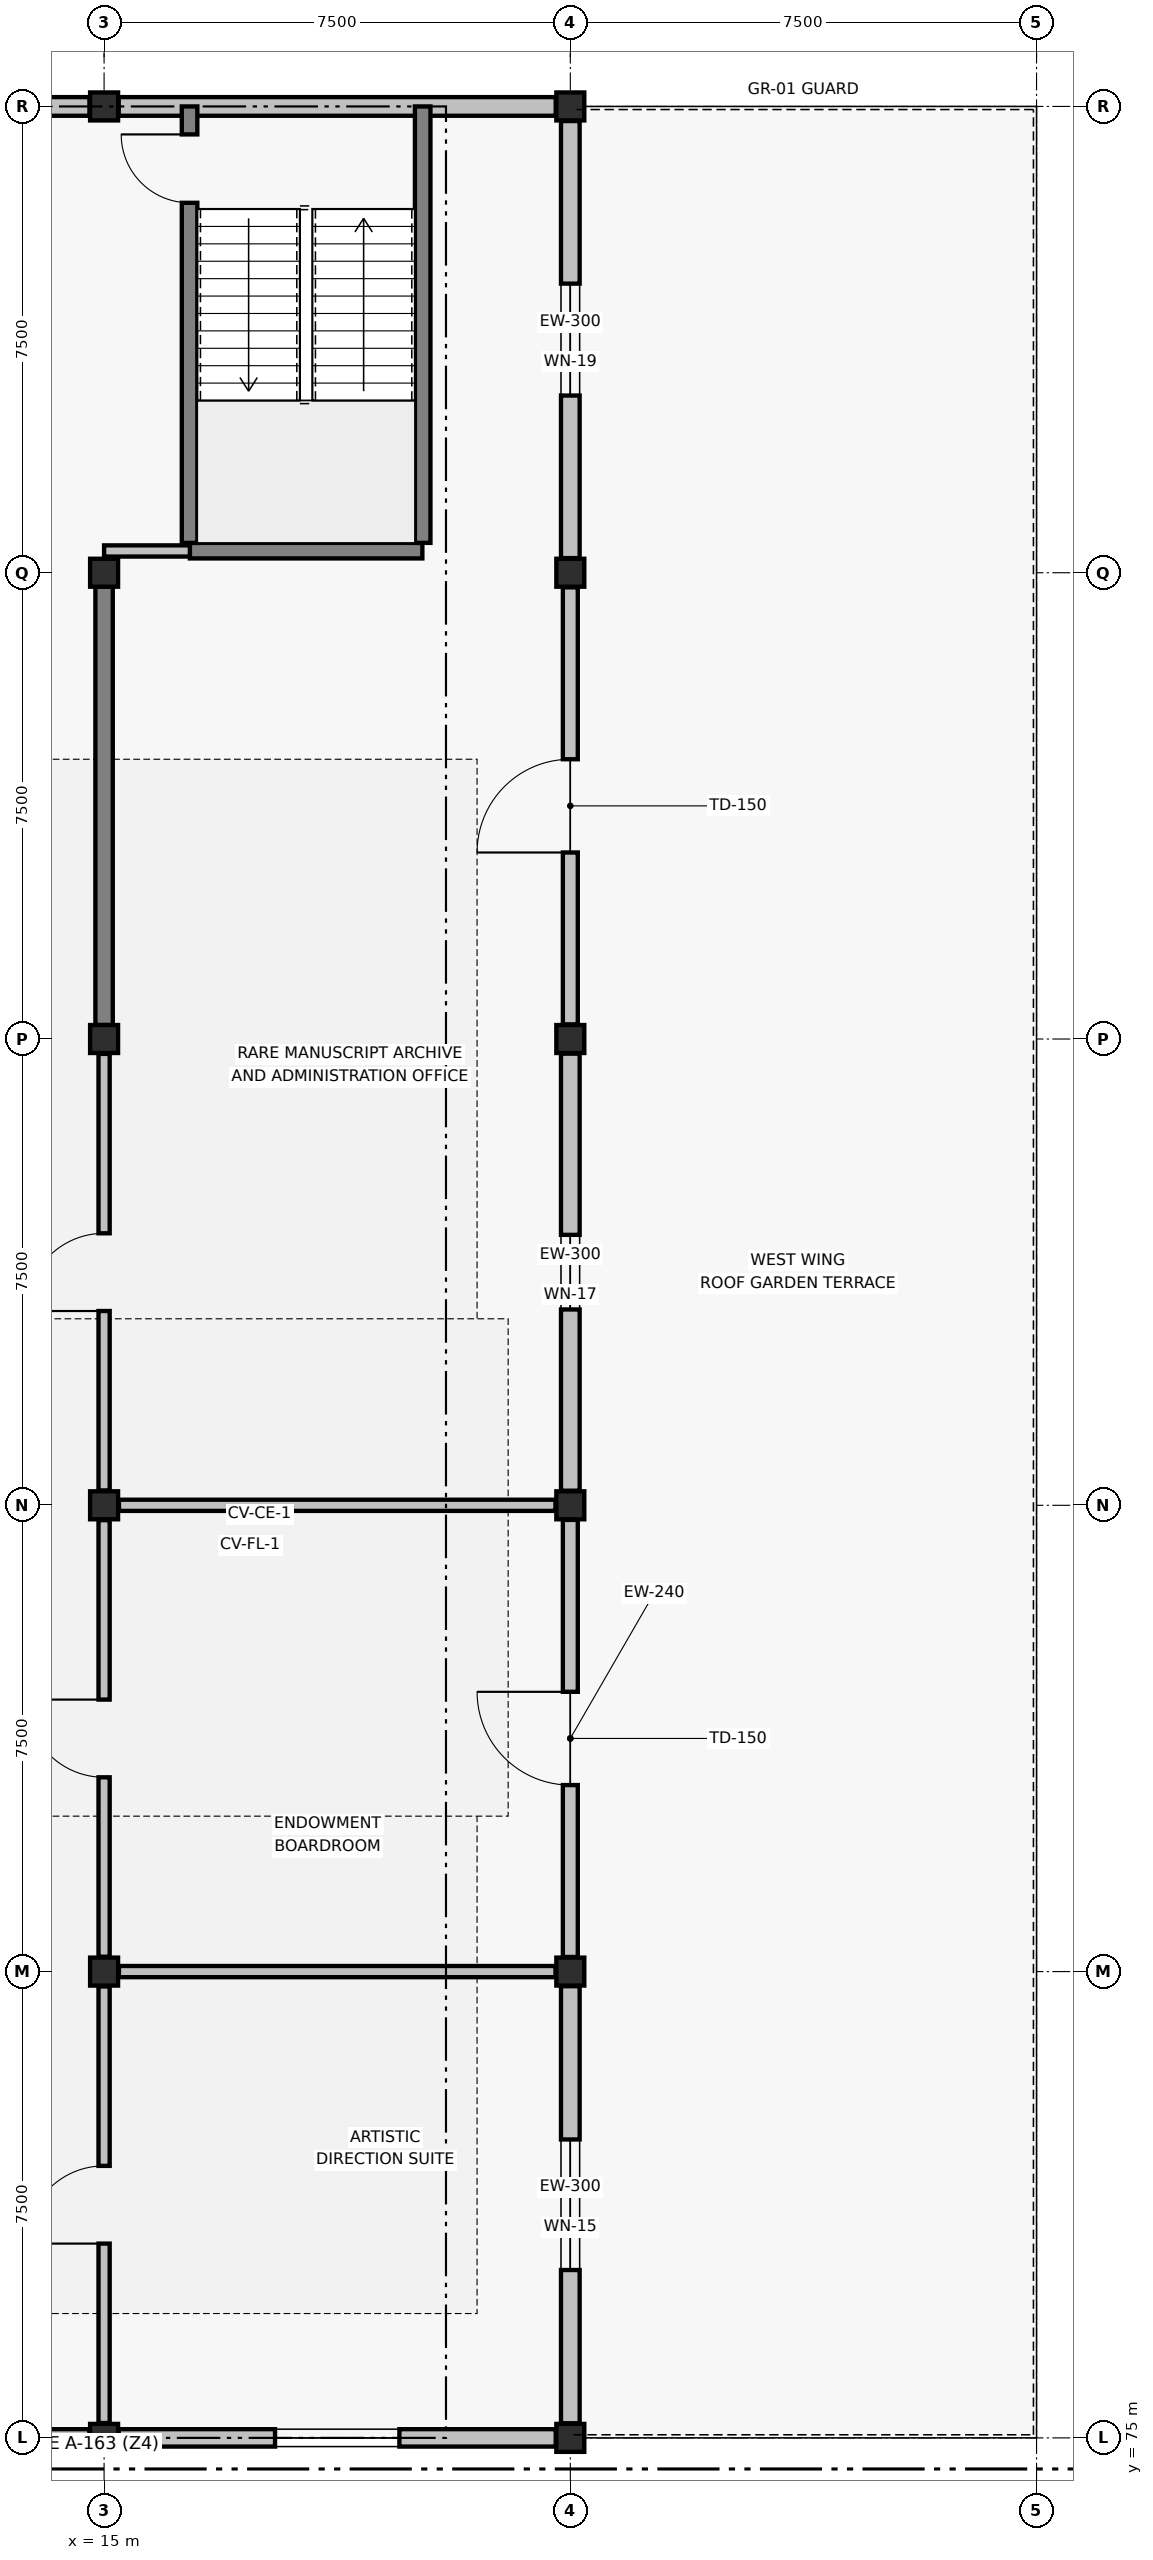
"""IFC4 building model, lengths in metres.
Left out: names, types, materials, properties, quantities, classifications, styles, units other than length and angle.
Written with IfcOpenShell. Run it as: python <this file> out.ifc"""

import sys

from ifc_helpers import new_model, si_unit, direction, frame, frame_2d, origin, origin_2d, place, context, subcontext, project, spatial, rectangle, extrude, element, fill, save


model = new_model("IFC4")
c1 = context("Model", 3, precision=1e-05, world=origin(), true_north=direction((0.0, 1.0)))
c2 = subcontext(c1, "Body", "Model", "MODEL_VIEW")
j1 = project(units=[si_unit("LENGTHUNIT", "METRE"), si_unit("PLANEANGLEUNIT", "RADIAN")], contexts=[c1])
p1 = place(None, origin())
s1 = spatial("IfcSite", under=j1, at=p1, CompositionType="ELEMENT")
p2 = place(p1, origin())
s2 = spatial("IfcBuilding", under=s1, at=p2, CompositionType="ELEMENT")
p3 = place(p2, frame((0.0, 0.0, 21.0)))
s3 = spatial("IfcBuildingStorey", under=s2, at=p3, CompositionType="ELEMENT", Elevation=21.0)
for number, where, z_axis, x_axis in (
    (1, (15.0, 75.0, 0.0), (0.0, 0.0, 1.0), (1.0, 0.0, 0.0)),
    (2, (15.0, 82.5, 0.0), (0.0, 0.0, 1.0), (1.0, 0.0, 0.0)),
    (3, (15.0, 90.0, 0.0), (0.0, 0.0, 1.0), (1.0, 0.0, 0.0)),
    (4, (15.0, 97.5, 0.0), (0.0, 0.0, 1.0), (1.0, 0.0, 0.0)),
    (5, (15.0, 105.0, 0.0), (0.0, 0.0, 1.0), (1.0, 0.0, 0.0)),
    (6, (15.0, 112.5, 0.0), (0.0, 0.0, 1.0), (1.0, 0.0, 0.0)),
    (7, (22.5, 75.0, 0.0), (0.0, 0.0, 1.0), (1.0, 0.0, 0.0)),
    (8, (22.5, 82.5, 0.0), (0.0, 0.0, 1.0), (1.0, 0.0, 0.0)),
    (9, (22.5, 90.0, 0.0), (0.0, 0.0, 1.0), (1.0, 0.0, 0.0)),
    (10, (22.5, 97.5, 0.0), (0.0, 0.0, 1.0), (1.0, 0.0, 0.0)),
    (11, (22.5, 105.0, 0.0), (0.0, 0.0, 1.0), (1.0, 0.0, 0.0)),
    (12, (22.5, 112.5, 0.0), (0.0, 0.0, 1.0), (1.0, 0.0, 0.0)),
):
    element("IfcColumn", number, at=place(p3, frame(where, z_axis=z_axis, x_axis=x_axis)), inside=s3, PredefinedType="COLUMN", context=c2, shape_type="SweptSolid", body=[
        extrude(rectangle(XDim=0.45, YDim=0.45, at=origin_2d()), origin(), (0.0, 0.0, 1.0), 4.2),
    ])
p4 = place(p3, frame((15.0, 97.725, 0.0), z_axis=(0.0, 0.0, 1.0), x_axis=(0.0, 1.0, 0.0)))
e13 = element("IfcWall", 13, at=p4, inside=s3, PredefinedType="SHEAR", context=c2, shape_type="SweptSolid", body=[
    extrude(rectangle(XDim=7.05, YDim=0.28, at=frame_2d((3.525, 0.0))), origin(), (0.0, 0.0, 1.0), 3.9),
])
p5 = place(p3, frame((8.12, 112.5, 0.0), z_axis=(0.0, 0.0, 1.0), x_axis=(1.0, 0.0, 0.0)))
e14 = element("IfcWall", 14, at=p5, inside=s3, PredefinedType="SOLIDWALL", context=c2, shape_type="SweptSolid", body=[
    extrude(rectangle(XDim=6.645, YDim=0.3, at=frame_2d((3.322, 0.0))), origin(), (0.0, 0.0, 1.0), 2.89),
])
p6 = place(p5, frame((2.33, 0.0, 0.6)))
e15 = element("IfcOpeningElement", 15, at=p6, cuts=e14, PredefinedType="OPENING", context=c2, shape_type="SweptSolid", body=[
    extrude(rectangle(XDim=1.6, YDim=1.3, at=frame_2d((0.8, 0.65))), frame((0.0, 0.16, 0.0), z_axis=(0.0, -1.0, 0.0), x_axis=(1.0, 0.0, 0.0)), (0.0, 0.0, 1.0), 0.32),
])
p7 = place(p3, frame((8.12, 75.0, 0.0), z_axis=(0.0, 0.0, 1.0), x_axis=(1.0, 0.0, 0.0)))
e16 = element("IfcWall", 16, at=p7, inside=s3, PredefinedType="SOLIDWALL", context=c2, shape_type="SweptSolid", body=[
    extrude(rectangle(XDim=6.645, YDim=0.28, at=frame_2d((3.322, 0.0))), origin(), (0.0, 0.0, 1.0), 2.89),
])
p8 = place(p7, frame((2.205, 0.0, 0.6)))
e17 = element("IfcOpeningElement", 17, at=p8, cuts=e16, PredefinedType="OPENING", context=c2, shape_type="SweptSolid", body=[
    extrude(rectangle(XDim=1.85, YDim=1.8, at=frame_2d((0.925, 0.9))), frame((0.0, 0.15, 0.0), z_axis=(0.0, -1.0, 0.0), x_axis=(1.0, 0.0, 0.0)), (0.0, 0.0, 1.0), 0.3),
])
p9 = place(p3, frame((15.235, 112.5, 0.0), z_axis=(0.0, 0.0, 1.0), x_axis=(1.0, 0.0, 0.0)))
e18 = element("IfcWall", 18, at=p9, inside=s3, PredefinedType="SOLIDWALL", context=c2, shape_type="SweptSolid", body=[
    extrude(rectangle(XDim=7.03, YDim=0.3, at=frame_2d((3.515, 0.0))), origin(), (0.0, 0.0, 1.0), 2.89),
])
p10 = place(p3, frame((15.235, 75.0, 0.0), z_axis=(0.0, 0.0, 1.0), x_axis=(1.0, 0.0, 0.0)))
e19 = element("IfcWall", 19, at=p10, inside=s3, PredefinedType="SOLIDWALL", context=c2, shape_type="SweptSolid", body=[
    extrude(rectangle(XDim=7.03, YDim=0.28, at=frame_2d((3.515, 0.0))), origin(), (0.0, 0.0, 1.0), 2.89),
])
p11 = place(p10, frame((2.515, 0.0, 0.6)))
e20 = element("IfcOpeningElement", 20, at=p11, cuts=e19, PredefinedType="OPENING", context=c2, shape_type="SweptSolid", body=[
    extrude(rectangle(XDim=2.0, YDim=1.45, at=frame_2d((1.0, 0.725))), frame((0.0, 0.15, 0.0), z_axis=(0.0, -1.0, 0.0), x_axis=(1.0, 0.0, 0.0)), (0.0, 0.0, 1.0), 0.3),
])
p12 = place(p3, frame((22.5, 75.235, 0.0), z_axis=(0.0, 0.0, 1.0), x_axis=(0.0, 1.0, 0.0)))
e21 = element("IfcWall", 21, at=p12, inside=s3, PredefinedType="SOLIDWALL", context=c2, shape_type="SweptSolid", body=[
    extrude(rectangle(XDim=7.03, YDim=0.3, at=frame_2d((3.515, 0.0))), origin(), (0.0, 0.0, 1.0), 3.09),
])
p13 = place(p12, frame((2.465, 0.0, 0.6)))
e22 = element("IfcOpeningElement", 22, at=p13, cuts=e21, PredefinedType="OPENING", context=c2, shape_type="SweptSolid", body=[
    extrude(rectangle(XDim=2.1, YDim=1.3, at=frame_2d((1.05, 0.65))), frame((0.0, 0.16, 0.0), z_axis=(0.0, -1.0, 0.0), x_axis=(1.0, 0.0, 0.0)), (0.0, 0.0, 1.0), 0.32),
])
p14 = place(p3, frame((22.5, 82.735, 0.0), z_axis=(0.0, 0.0, 1.0), x_axis=(0.0, 1.0, 0.0)))
e23 = element("IfcWall", 23, at=p14, inside=s3, PredefinedType="SOLIDWALL", context=c2, shape_type="SweptSolid", body=[
    extrude(rectangle(XDim=7.03, YDim=0.24, at=frame_2d((3.515, 0.0))), origin(), (0.0, 0.0, 1.0), 2.94),
])
p15 = place(p14, frame((2.765, 0.0, 0.0)))
e24 = element("IfcOpeningElement", 24, at=p15, cuts=e23, PredefinedType="OPENING", context=c2, shape_type="SweptSolid", body=[
    extrude(rectangle(XDim=1.5, YDim=2.15, at=frame_2d((0.75, 1.075))), frame((0.0, 0.13, 0.0), z_axis=(0.0, -1.0, 0.0), x_axis=(1.0, 0.0, 0.0)), (0.0, 0.0, 1.0), 0.26),
])
p16 = place(p3, frame((22.5, 90.235, 0.0), z_axis=(0.0, 0.0, 1.0), x_axis=(0.0, 1.0, 0.0)))
e25 = element("IfcWall", 25, at=p16, inside=s3, PredefinedType="SOLIDWALL", context=c2, shape_type="SweptSolid", body=[
    extrude(rectangle(XDim=7.03, YDim=0.3, at=frame_2d((3.515, 0.0))), origin(), (0.0, 0.0, 1.0), 2.94),
])
p17 = place(p16, frame((2.915, 0.0, 0.6)))
e26 = element("IfcOpeningElement", 26, at=p17, cuts=e25, PredefinedType="OPENING", context=c2, shape_type="SweptSolid", body=[
    extrude(rectangle(XDim=1.2, YDim=1.2, at=frame_2d((0.6, 0.6))), frame((0.0, 0.16, 0.0), z_axis=(0.0, -1.0, 0.0), x_axis=(1.0, 0.0, 0.0)), (0.0, 0.0, 1.0), 0.32),
])
p18 = place(p3, frame((22.5, 97.735, 0.0), z_axis=(0.0, 0.0, 1.0), x_axis=(0.0, 1.0, 0.0)))
e27 = element("IfcWall", 27, at=p18, inside=s3, PredefinedType="SOLIDWALL", context=c2, shape_type="SweptSolid", body=[
    extrude(rectangle(XDim=7.03, YDim=0.24, at=frame_2d((3.515, 0.0))), origin(), (0.0, 0.0, 1.0), 2.99),
])
p19 = place(p18, frame((2.765, 0.0, 0.0)))
e28 = element("IfcOpeningElement", 28, at=p19, cuts=e27, PredefinedType="OPENING", context=c2, shape_type="SweptSolid", body=[
    extrude(rectangle(XDim=1.5, YDim=2.15, at=frame_2d((0.75, 1.075))), frame((0.0, 0.13, 0.0), z_axis=(0.0, -1.0, 0.0), x_axis=(1.0, 0.0, 0.0)), (0.0, 0.0, 1.0), 0.26),
])
p20 = place(p3, frame((22.5, 105.235, 0.0), z_axis=(0.0, 0.0, 1.0), x_axis=(0.0, 1.0, 0.0)))
e29 = element("IfcWall", 29, at=p20, inside=s3, PredefinedType="SOLIDWALL", context=c2, shape_type="SweptSolid", body=[
    extrude(rectangle(XDim=7.03, YDim=0.3, at=frame_2d((3.515, 0.0))), origin(), (0.0, 0.0, 1.0), 3.04),
])
p21 = place(p20, frame((2.615, 0.0, 0.6)))
e30 = element("IfcOpeningElement", 30, at=p21, cuts=e29, PredefinedType="OPENING", context=c2, shape_type="SweptSolid", body=[
    extrude(rectangle(XDim=1.8, YDim=1.2, at=frame_2d((0.9, 0.6))), frame((0.0, 0.16, 0.0), z_axis=(0.0, -1.0, 0.0), x_axis=(1.0, 0.0, 0.0)), (0.0, 0.0, 1.0), 0.32),
])
p22 = place(p3, frame((16.38, 105.355, 0.0), z_axis=(0.0, 0.0, 1.0), x_axis=(1.0, 0.0, 0.0)))
e31 = element("IfcWall", 31, at=p22, inside=s3, PredefinedType="SOLIDWALL", context=c2, shape_type="SweptSolid", body=[
    extrude(rectangle(XDim=3.74, YDim=0.25, at=frame_2d((1.87, 0.0))), origin(), (0.0, 0.0, 1.0), 3.92),
])
p23 = place(p3, frame((16.375, 105.48, 0.0), z_axis=(0.0, 0.0, 1.0), x_axis=(0.0, 1.0, 0.0)))
e32 = element("IfcWall", 32, at=p23, inside=s3, PredefinedType="SOLIDWALL", context=c2, shape_type="SweptSolid", body=[
    extrude(rectangle(XDim=7.02, YDim=0.25, at=frame_2d((3.51, 0.0))), origin(), (0.0, 0.0, 1.0), 3.92),
])
p24 = place(p23, frame((5.47, 0.0, 0.0)))
e33 = element("IfcOpeningElement", 33, at=p24, cuts=e32, PredefinedType="OPENING", context=c2, shape_type="SweptSolid", body=[
    extrude(rectangle(XDim=1.1, YDim=2.15, at=frame_2d((0.55, 1.075))), frame((0.0, 0.135, 0.0), z_axis=(0.0, -1.0, 0.0), x_axis=(1.0, 0.0, 0.0)), (0.0, 0.0, 1.0), 0.27),
])
p25 = place(p3, frame((20.125, 105.48, 0.0), z_axis=(0.0, 0.0, 1.0), x_axis=(0.0, 1.0, 0.0)))
e34 = element("IfcWall", 34, at=p25, inside=s3, PredefinedType="SOLIDWALL", context=c2, shape_type="SweptSolid", body=[
    extrude(rectangle(XDim=7.02, YDim=0.25, at=frame_2d((3.51, 0.0))), origin(), (0.0, 0.0, 1.0), 3.92),
])
p26 = place(p3, frame((15.0, 105.35, 0.0), z_axis=(0.0, 0.0, 1.0), x_axis=(1.0, 0.0, 0.0)))
e35 = element("IfcWall", 35, at=p26, inside=s3, PredefinedType="PARTITIONING", context=c2, shape_type="SweptSolid", body=[
    extrude(rectangle(XDim=1.38, YDim=0.18, at=frame_2d((0.69, 0.0))), origin(), (0.0, 0.0, 1.0), 2.89),
])
for number, where, z_axis, x_axis in (
    (36, (15.239, 82.5, 0.0), (0.0, 0.0, 1.0), (1.0, 0.0, 0.0)),
    (37, (15.239, 90.0, 0.0), (0.0, 0.0, 1.0), (1.0, 0.0, 0.0)),
):
    element("IfcWall", number, at=place(p3, frame(where, z_axis=z_axis, x_axis=x_axis)), inside=s3, PredefinedType="PARTITIONING", context=c2, shape_type="SweptSolid", body=[
        extrude(rectangle(XDim=7.022, YDim=0.18, at=frame_2d((3.511, 0.0))), origin(), (0.0, 0.0, 1.0), 2.89),
    ])
p27 = place(p3, frame((15.0, 75.239, 0.0), z_axis=(0.0, 0.0, 1.0), x_axis=(0.0, 1.0, 0.0)))
e38 = element("IfcWall", 38, at=p27, inside=s3, PredefinedType="PARTITIONING", context=c2, shape_type="SweptSolid", body=[
    extrude(rectangle(XDim=7.022, YDim=0.18, at=frame_2d((3.511, 0.0))), origin(), (0.0, 0.0, 1.0), 2.89),
])
p28 = place(p27, frame((2.886, 0.0, 0.0)))
e39 = element("IfcOpeningElement", 39, at=p28, cuts=e38, PredefinedType="OPENING", context=c2, shape_type="SweptSolid", body=[
    extrude(rectangle(XDim=1.25, YDim=2.14, at=frame_2d((0.625, 1.07))), frame((0.0, 0.1, 0.0), z_axis=(0.0, -1.0, 0.0), x_axis=(1.0, 0.0, 0.0)), (0.0, 0.0, 1.0), 0.2),
])
p29 = place(p3, frame((15.0, 82.739, 0.0), z_axis=(0.0, 0.0, 1.0), x_axis=(0.0, 1.0, 0.0)))
e40 = element("IfcWall", 40, at=p29, inside=s3, PredefinedType="PARTITIONING", context=c2, shape_type="SweptSolid", body=[
    extrude(rectangle(XDim=7.022, YDim=0.18, at=frame_2d((3.511, 0.0))), origin(), (0.0, 0.0, 1.0), 2.89),
])
p30 = place(p29, frame((2.886, 0.0, 0.0)))
e41 = element("IfcOpeningElement", 41, at=p30, cuts=e40, PredefinedType="OPENING", context=c2, shape_type="SweptSolid", body=[
    extrude(rectangle(XDim=1.25, YDim=2.14, at=frame_2d((0.625, 1.07))), frame((0.0, 0.1, 0.0), z_axis=(0.0, -1.0, 0.0), x_axis=(1.0, 0.0, 0.0)), (0.0, 0.0, 1.0), 0.2),
])
p31 = place(p3, frame((15.0, 90.239, 0.0), z_axis=(0.0, 0.0, 1.0), x_axis=(0.0, 1.0, 0.0)))
e42 = element("IfcWall", 42, at=p31, inside=s3, PredefinedType="PARTITIONING", context=c2, shape_type="SweptSolid", body=[
    extrude(rectangle(XDim=7.022, YDim=0.18, at=frame_2d((3.511, 0.0))), origin(), (0.0, 0.0, 1.0), 2.89),
])
p32 = place(p31, frame((2.886, 0.0, 0.0)))
e43 = element("IfcOpeningElement", 43, at=p32, cuts=e42, PredefinedType="OPENING", context=c2, shape_type="SweptSolid", body=[
    extrude(rectangle(XDim=1.25, YDim=2.14, at=frame_2d((0.625, 1.07))), frame((0.0, 0.1, 0.0), z_axis=(0.0, -1.0, 0.0), x_axis=(1.0, 0.0, 0.0)), (0.0, 0.0, 1.0), 0.2),
])
p33 = place(p11, origin())
e44 = element("IfcWindow", 44, at=p33, inside=s3, PartitioningType="SINGLE_PANEL", PredefinedType="WINDOW", context=c2, shape_type="SweptSolid", body=[
    extrude(rectangle(XDim=2.0, YDim=1.45, at=frame_2d((1.0, 0.725))), frame((0.0, 0.03, 0.0), z_axis=(0.0, -1.0, 0.0), x_axis=(1.0, 0.0, 0.0)), (0.0, 0.0, 1.0), 0.06),
])
fill(e20, e44)
p34 = place(p13, origin())
e45 = element("IfcWindow", 45, at=p34, inside=s3, PartitioningType="SINGLE_PANEL", PredefinedType="WINDOW", context=c2, shape_type="SweptSolid", body=[
    extrude(rectangle(XDim=2.1, YDim=1.3, at=frame_2d((1.05, 0.65))), frame((0.0, 0.03, 0.0), z_axis=(0.0, -1.0, 0.0), x_axis=(1.0, 0.0, 0.0)), (0.0, 0.0, 1.0), 0.06),
])
fill(e22, e45)
p35 = place(p15, frame((1.5, 0.0, 0.0), z_axis=(0.0, 0.0, 1.0), x_axis=(-1.0, 0.0, 0.0)))
e46 = element("IfcDoor", 46, at=p35, inside=s3, OperationType="SINGLE_SWING_LEFT", PredefinedType="DOOR", context=c2, shape_type="SweptSolid", body=[
    extrude(rectangle(XDim=1.5, YDim=2.15, at=frame_2d((0.75, 1.075))), frame((0.0, 0.025, 0.0), z_axis=(0.0, -1.0, 0.0), x_axis=(1.0, 0.0, 0.0)), (0.0, 0.0, 1.0), 0.05),
])
fill(e24, e46)
p36 = place(p17, origin())
e47 = element("IfcWindow", 47, at=p36, inside=s3, PartitioningType="SINGLE_PANEL", PredefinedType="WINDOW", context=c2, shape_type="SweptSolid", body=[
    extrude(rectangle(XDim=1.2, YDim=1.2, at=frame_2d((0.6, 0.6))), frame((0.0, 0.03, 0.0), z_axis=(0.0, -1.0, 0.0), x_axis=(1.0, 0.0, 0.0)), (0.0, 0.0, 1.0), 0.06),
])
fill(e26, e47)
p37 = place(p19, frame((1.5, 0.0, 0.0), z_axis=(0.0, 0.0, 1.0), x_axis=(-1.0, 0.0, 0.0)))
e48 = element("IfcDoor", 48, at=p37, inside=s3, OperationType="SINGLE_SWING_RIGHT", PredefinedType="DOOR", context=c2, shape_type="SweptSolid", body=[
    extrude(rectangle(XDim=1.5, YDim=2.15, at=frame_2d((0.75, 1.075))), frame((0.0, 0.025, 0.0), z_axis=(0.0, -1.0, 0.0), x_axis=(1.0, 0.0, 0.0)), (0.0, 0.0, 1.0), 0.05),
])
fill(e28, e48)
p38 = place(p21, origin())
e49 = element("IfcWindow", 49, at=p38, inside=s3, PartitioningType="SINGLE_PANEL", PredefinedType="WINDOW", context=c2, shape_type="SweptSolid", body=[
    extrude(rectangle(XDim=1.8, YDim=1.2, at=frame_2d((0.9, 0.6))), frame((0.0, 0.03, 0.0), z_axis=(0.0, -1.0, 0.0), x_axis=(1.0, 0.0, 0.0)), (0.0, 0.0, 1.0), 0.06),
])
fill(e30, e49)
p39 = place(p24, origin())
e50 = element("IfcDoor", 50, at=p39, inside=s3, OperationType="SINGLE_SWING_RIGHT", PredefinedType="DOOR", context=c2, shape_type="SweptSolid", body=[
    extrude(rectangle(XDim=1.1, YDim=2.15, at=frame_2d((0.55, 1.075))), frame((0.0, 0.025, 0.0), z_axis=(0.0, -1.0, 0.0), x_axis=(1.0, 0.0, 0.0)), (0.0, 0.0, 1.0), 0.05),
])
fill(e33, e50)
p40 = place(p28, origin())
e51 = element("IfcDoor", 51, at=p40, inside=s3, OperationType="SINGLE_SWING_LEFT", PredefinedType="DOOR", context=c2, shape_type="SweptSolid", body=[
    extrude(rectangle(XDim=1.25, YDim=2.14, at=frame_2d((0.625, 1.07))), frame((0.0, 0.025, 0.0), z_axis=(0.0, -1.0, 0.0), x_axis=(1.0, 0.0, 0.0)), (0.0, 0.0, 1.0), 0.05),
])
fill(e39, e51)
p41 = place(p30, origin())
e52 = element("IfcDoor", 52, at=p41, inside=s3, OperationType="SINGLE_SWING_RIGHT", PredefinedType="DOOR", context=c2, shape_type="SweptSolid", body=[
    extrude(rectangle(XDim=1.25, YDim=2.14, at=frame_2d((0.625, 1.07))), frame((0.0, 0.025, 0.0), z_axis=(0.0, -1.0, 0.0), x_axis=(1.0, 0.0, 0.0)), (0.0, 0.0, 1.0), 0.05),
])
fill(e41, e52)
p42 = place(p32, origin())
e53 = element("IfcDoor", 53, at=p42, inside=s3, OperationType="SINGLE_SWING_LEFT", PredefinedType="DOOR", context=c2, shape_type="SweptSolid", body=[
    extrude(rectangle(XDim=1.25, YDim=2.14, at=frame_2d((0.625, 1.07))), frame((0.0, 0.025, 0.0), z_axis=(0.0, -1.0, 0.0), x_axis=(1.0, 0.0, 0.0)), (0.0, 0.0, 1.0), 0.05),
])
fill(e43, e53)
save(model, sys.argv[1])
